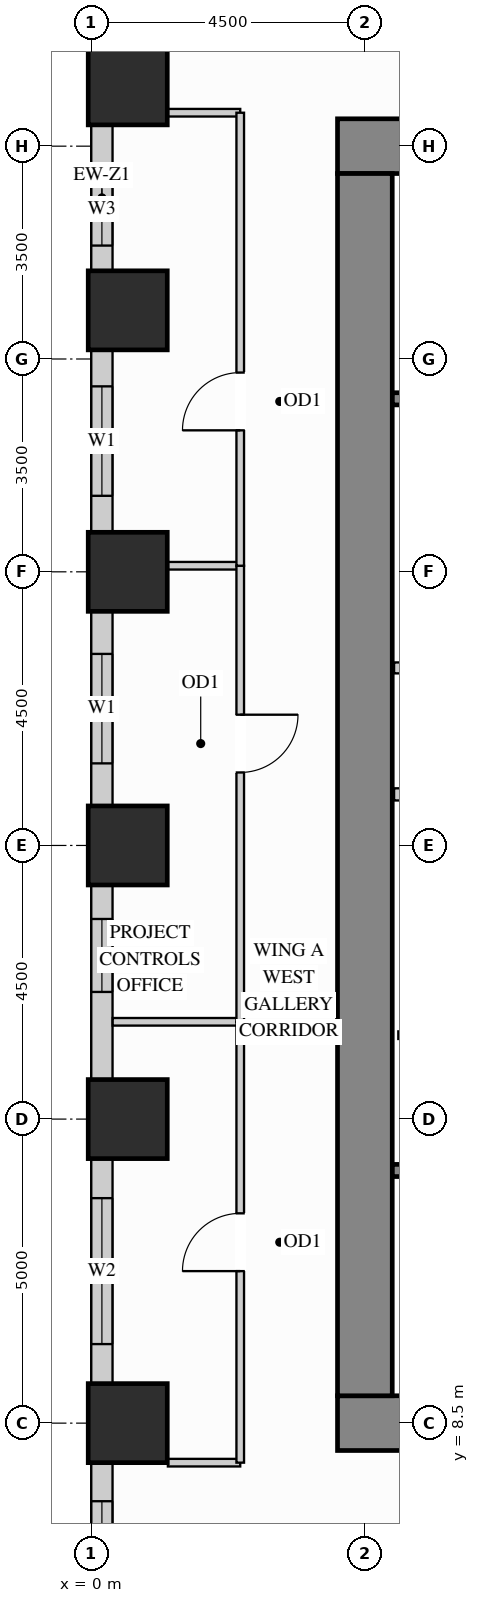
"""IFC4 building model, lengths in metres.
Left out: names, types, materials, properties, quantities, classifications, styles, units other than length and angle.
Written with IfcOpenShell. Run it as: python <this file> out.ifc"""

import sys

from ifc_helpers import new_model, si_unit, direction, frame, frame_2d, origin, origin_2d, place, context, subcontext, project, spatial, rectangle, extrude, source, transform, mapped, element, fill, save


model = new_model("IFC4")
c1 = context("Model", 3, precision=1e-05, world=origin(), true_north=direction((0.0, 1.0)))
c2 = subcontext(c1, "Body", "Model", "MODEL_VIEW")
j1 = project(units=[si_unit("LENGTHUNIT", "METRE"), si_unit("PLANEANGLEUNIT", "RADIAN")], contexts=[c1])
p1 = place(None, origin())
s1 = spatial("IfcSite", under=j1, at=p1, CompositionType="ELEMENT")
p2 = place(p1, origin())
s2 = spatial("IfcBuilding", under=s1, at=p2, CompositionType="ELEMENT")
p3 = place(p2, frame((0.0, 0.0, 47.7)))
s3 = spatial("IfcBuildingStorey", under=s2, at=p3, CompositionType="ELEMENT", Elevation=47.7)
m1 = source(origin(), c2, "Body", "SweptSolid", [
    extrude(rectangle(XDim=1.3, YDim=1.3, at=origin_2d()), origin(), (0.0, 0.0, 1.0), 3.38),
])
for number, where, z_axis, x_axis in (
    (1, (0.6, 13.5, 0.0), (0.0, 0.0, 1.0), (1.0, 0.0, 0.0)),
    (2, (0.6, 18.0, 0.0), (0.0, 0.0, 1.0), (1.0, 0.0, 0.0)),
    (3, (0.6, 22.5, 0.0), (0.0, 0.0, 1.0), (1.0, 0.0, 0.0)),
    (4, (0.6, 26.8, 0.0), (0.0, 0.0, 1.0), (1.0, 0.0, 0.0)),
    (5, (0.6, 30.5, 0.0), (0.0, 0.0, 1.0), (1.0, 0.0, 0.0)),
    (6, (0.6, 8.5, 0.0), (0.0, 0.0, 1.0), (1.0, 0.0, 0.0)),
):
    element("IfcColumn", number, at=place(p3, frame(where, z_axis=z_axis, x_axis=x_axis)), inside=s3, PredefinedType="COLUMN", context=c2, shape_type="MappedRepresentation", body=[
        mapped(m1, transform((0.0, 0.0, 0.0), x_axis=(1.0, 0.0, 0.0), y_axis=(0.0, 1.0, 0.0), z_axis=(0.0, 0.0, 1.0))),
    ])
m2 = source(origin(), c2, "Body", "SweptSolid", [
    extrude(rectangle(XDim=10.9, YDim=0.9, at=frame_2d((5.45, 0.0))), origin(), (0.0, 0.0, 1.0), 3.38),
])
for number, where, z_axis, x_axis in (
    (7, (4.05, 29.5, 0.0), (0.0, 0.0, 1.0), (1.0, 0.0, 0.0)),
    (8, (4.05, 8.5, 0.0), (0.0, 0.0, 1.0), (1.0, 0.0, 0.0)),
):
    element("IfcWall", number, at=place(p3, frame(where, z_axis=z_axis, x_axis=x_axis)), inside=s3, PredefinedType="SHEAR", context=c2, shape_type="MappedRepresentation", body=[
        mapped(m2, transform((0.0, 0.0, 0.0), x_axis=(1.0, 0.0, 0.0), y_axis=(0.0, 1.0, 0.0), z_axis=(0.0, 0.0, 1.0))),
    ])
m3 = source(origin(), c2, "Body", "SweptSolid", [
    extrude(rectangle(XDim=20.1, YDim=0.9, at=frame_2d((10.05, 0.0))), origin(), (0.0, 0.0, 1.0), 3.38),
])
p4 = place(p3, frame((4.5, 8.95, 0.0), z_axis=(0.0, 0.0, 1.0), x_axis=(0.0, 1.0, 0.0)))
e9 = element("IfcWall", 9, at=p4, inside=s3, PredefinedType="SHEAR", context=c2, shape_type="MappedRepresentation", body=[
    mapped(m3, transform((0.0, 0.0, 0.0), x_axis=(1.0, 0.0, 0.0), y_axis=(0.0, 1.0, 0.0), z_axis=(0.0, 0.0, 1.0))),
])
p5 = place(p3, frame((0.175, 29.852, 0.0), z_axis=(0.0, 0.0, 1.0), x_axis=(0.0, -1.0, 0.0)))
e10 = element("IfcWall", 10, at=p5, inside=s3, PredefinedType="SOLIDWALL", context=c2, shape_type="SweptSolid", body=[
    extrude(rectangle(XDim=2.404, YDim=0.35, at=frame_2d((1.202, 0.0))), origin(), (0.0, 0.0, 1.0), 2.51),
])
p6 = place(p5, frame((0.787, 0.0, 0.78)))
e11 = element("IfcOpeningElement", 11, at=p6, cuts=e10, PredefinedType="OPENING", context=c2, shape_type="SweptSolid", body=[
    extrude(rectangle(XDim=1.2, YDim=1.55, at=frame_2d((0.6, 0.775))), frame((0.0, 0.185, 0.0), z_axis=(0.0, -1.0, 0.0), x_axis=(1.0, 0.0, 0.0)), (0.0, 0.0, 1.0), 0.37),
])
p7 = place(p3, frame((0.175, 26.152, 0.0), z_axis=(0.0, 0.0, 1.0), x_axis=(0.0, -1.0, 0.0)))
e12 = element("IfcWall", 12, at=p7, inside=s3, PredefinedType="SOLIDWALL", context=c2, shape_type="SweptSolid", body=[
    extrude(rectangle(XDim=3.004, YDim=0.35, at=frame_2d((1.502, 0.0))), origin(), (0.0, 0.0, 1.0), 2.51),
])
p8 = place(p7, frame((0.602, 0.0, 0.78)))
e13 = element("IfcOpeningElement", 13, at=p8, cuts=e12, PredefinedType="OPENING", context=c2, shape_type="SweptSolid", body=[
    extrude(rectangle(XDim=1.8, YDim=1.55, at=frame_2d((0.9, 0.775))), frame((0.0, 0.185, 0.0), z_axis=(0.0, -1.0, 0.0), x_axis=(1.0, 0.0, 0.0)), (0.0, 0.0, 1.0), 0.37),
])
p9 = place(p3, frame((0.175, 21.852, 0.0), z_axis=(0.0, 0.0, 1.0), x_axis=(0.0, -1.0, 0.0)))
e14 = element("IfcWall", 14, at=p9, inside=s3, PredefinedType="SOLIDWALL", context=c2, shape_type="SweptSolid", body=[
    extrude(rectangle(XDim=3.204, YDim=0.35, at=frame_2d((1.602, 0.0))), origin(), (0.0, 0.0, 1.0), 2.51),
])
p10 = place(p9, frame((0.702, 0.0, 0.78)))
e15 = element("IfcOpeningElement", 15, at=p10, cuts=e14, PredefinedType="OPENING", context=c2, shape_type="SweptSolid", body=[
    extrude(rectangle(XDim=1.8, YDim=1.55, at=frame_2d((0.9, 0.775))), frame((0.0, 0.185, 0.0), z_axis=(0.0, -1.0, 0.0), x_axis=(1.0, 0.0, 0.0)), (0.0, 0.0, 1.0), 0.37),
])
p11 = place(p3, frame((0.175, 17.352, 0.0), z_axis=(0.0, 0.0, 1.0), x_axis=(0.0, -1.0, 0.0)))
e16 = element("IfcWall", 16, at=p11, inside=s3, PredefinedType="SOLIDWALL", context=c2, shape_type="SweptSolid", body=[
    extrude(rectangle(XDim=3.204, YDim=0.35, at=frame_2d((1.602, 0.0))), origin(), (0.0, 0.0, 1.0), 2.51),
])
p12 = place(p11, frame((0.561, 0.0, 0.78)))
e17 = element("IfcOpeningElement", 17, at=p12, cuts=e16, PredefinedType="OPENING", context=c2, shape_type="SweptSolid", body=[
    extrude(rectangle(XDim=1.2, YDim=1.55, at=frame_2d((0.6, 0.775))), frame((0.0, 0.185, 0.0), z_axis=(0.0, -1.0, 0.0), x_axis=(1.0, 0.0, 0.0)), (0.0, 0.0, 1.0), 0.37),
])
p13 = place(p3, frame((0.175, 12.852, 0.0), z_axis=(0.0, 0.0, 1.0), x_axis=(0.0, -1.0, 0.0)))
e18 = element("IfcWall", 18, at=p13, inside=s3, PredefinedType="SOLIDWALL", context=c2, shape_type="SweptSolid", body=[
    extrude(rectangle(XDim=3.704, YDim=0.35, at=frame_2d((1.852, 0.0))), origin(), (0.0, 0.0, 1.0), 2.51),
])
p14 = place(p13, frame((0.652, 0.0, 0.78)))
e19 = element("IfcOpeningElement", 19, at=p14, cuts=e18, PredefinedType="OPENING", context=c2, shape_type="SweptSolid", body=[
    extrude(rectangle(XDim=2.4, YDim=1.55, at=frame_2d((1.2, 0.775))), frame((0.0, 0.185, 0.0), z_axis=(0.0, -1.0, 0.0), x_axis=(1.0, 0.0, 0.0)), (0.0, 0.0, 1.0), 0.37),
])
p15 = place(p3, frame((0.175, 7.852, 0.0), z_axis=(0.0, 0.0, 1.0), x_axis=(0.0, -1.0, 0.0)))
e20 = element("IfcWall", 20, at=p15, inside=s3, PredefinedType="SOLIDWALL", context=c2, shape_type="SweptSolid", body=[
    extrude(rectangle(XDim=3.704, YDim=0.35, at=frame_2d((1.852, 0.0))), origin(), (0.0, 0.0, 1.0), 2.51),
])
p16 = place(p15, frame((0.636, 0.0, 0.78)))
e21 = element("IfcOpeningElement", 21, at=p16, cuts=e20, PredefinedType="OPENING", context=c2, shape_type="SweptSolid", body=[
    extrude(rectangle(XDim=1.2, YDim=1.55, at=frame_2d((0.6, 0.775))), frame((0.0, 0.185, 0.0), z_axis=(0.0, -1.0, 0.0), x_axis=(1.0, 0.0, 0.0)), (0.0, 0.0, 1.0), 0.37),
])
m4 = source(origin(), c2, "Body", "SweptSolid", [
    extrude(rectangle(XDim=2.17, YDim=0.18, at=frame_2d((1.085, 0.0))), origin(), (0.0, 0.0, 1.0), 3.365),
])
p17 = place(p3, frame((4.98, 20.92, 0.0), z_axis=(0.0, 0.0, 1.0), x_axis=(1.0, 0.0, 0.0)))
e22 = element("IfcWall", 22, at=p17, inside=s3, PredefinedType="PARTITIONING", context=c2, shape_type="MappedRepresentation", body=[
    mapped(m4, transform((0.0, 0.0, 0.0), x_axis=(1.0, 0.0, 0.0), y_axis=(0.0, 1.0, 0.0), z_axis=(0.0, 0.0, 1.0))),
])
p18 = place(p3, frame((5.05, 14.88, 0.0), z_axis=(0.0, 0.0, 1.0), x_axis=(1.0, 0.0, 0.0)))
e23 = element("IfcWall", 23, at=p18, inside=s3, PredefinedType="PARTITIONING", context=c2, shape_type="SweptSolid", body=[
    extrude(rectangle(XDim=2.35, YDim=0.125, at=frame_2d((1.175, 0.0))), origin(), (0.0, 0.0, 1.0), 3.365),
])
p19 = place(p18, frame((0.7, 0.0, 0.0)))
e24 = element("IfcOpeningElement", 24, at=p19, cuts=e23, PredefinedType="OPENING", context=c2, shape_type="SweptSolid", body=[
    extrude(rectangle(XDim=0.85, YDim=2.1, at=frame_2d((0.425, 1.05))), frame((0.0, 0.073, 0.0), z_axis=(0.0, -1.0, 0.0), x_axis=(1.0, 0.0, 0.0)), (0.0, 0.0, 1.0), 0.145),
])
m5 = source(origin(), c2, "Body", "SweptSolid", [
    extrude(rectangle(XDim=1.19, YDim=0.125, at=frame_2d((0.595, 0.0))), origin(), (0.0, 0.0, 1.0), 3.365),
])
for number, where, z_axis, x_axis in (
    (25, (1.26, 30.05, 0.0), (0.0, 0.0, 1.0), (1.0, 0.0, 0.0)),
    (26, (1.26, 7.85, 0.0), (0.0, 0.0, 1.0), (1.0, 0.0, 0.0)),
):
    element("IfcWall", number, at=place(p3, frame(where, z_axis=z_axis, x_axis=x_axis)), inside=s3, PredefinedType="PARTITIONING", context=c2, shape_type="MappedRepresentation", body=[
        mapped(m5, transform((0.0, 0.0, 0.0), x_axis=(1.0, 0.0, 0.0), y_axis=(0.0, 1.0, 0.0), z_axis=(0.0, 0.0, 1.0))),
    ])
m6 = source(origin(), c2, "Body", "SweptSolid", [
    extrude(rectangle(XDim=2.098, YDim=0.125, at=frame_2d((1.049, 0.0))), origin(), (0.0, 0.0, 1.0), 3.365),
])
p20 = place(p3, frame((0.352, 15.1, 0.0), z_axis=(0.0, 0.0, 1.0), x_axis=(1.0, 0.0, 0.0)))
e27 = element("IfcWall", 27, at=p20, inside=s3, PredefinedType="PARTITIONING", context=c2, shape_type="MappedRepresentation", body=[
    mapped(m6, transform((0.0, 0.0, 0.0), x_axis=(1.0, 0.0, 0.0), y_axis=(0.0, 1.0, 0.0), z_axis=(0.0, 0.0, 1.0))),
])
p21 = place(p3, frame((1.26, 22.6, 0.0), z_axis=(0.0, 0.0, 1.0), x_axis=(1.0, 0.0, 0.0)))
e28 = element("IfcWall", 28, at=p21, inside=s3, PredefinedType="PARTITIONING", context=c2, shape_type="MappedRepresentation", body=[
    mapped(m5, transform((0.0, 0.0, 0.0), x_axis=(1.0, 0.0, 0.0), y_axis=(0.0, 1.0, 0.0), z_axis=(0.0, 0.0, 1.0))),
])
p22 = place(p3, frame((2.45, 7.85, 0.0), z_axis=(0.0, 0.0, 1.0), x_axis=(0.0, 1.0, 0.0)))
e29 = element("IfcWall", 29, at=p22, inside=s3, PredefinedType="PARTITIONING", context=c2, shape_type="SweptSolid", body=[
    extrude(rectangle(XDim=7.25, YDim=0.125, at=frame_2d((3.625, 0.0))), origin(), (0.0, 0.0, 1.0), 3.365),
])
p23 = place(p22, frame((3.15, 0.0, 0.0)))
e30 = element("IfcOpeningElement", 30, at=p23, cuts=e29, PredefinedType="OPENING", context=c2, shape_type="SweptSolid", body=[
    extrude(rectangle(XDim=0.95, YDim=2.15, at=frame_2d((0.475, 1.075))), frame((0.0, 0.073, 0.0), z_axis=(0.0, -1.0, 0.0), x_axis=(1.0, 0.0, 0.0)), (0.0, 0.0, 1.0), 0.145),
])
p24 = place(p3, frame((2.45, 15.1, 0.0), z_axis=(0.0, 0.0, 1.0), x_axis=(0.0, 1.0, 0.0)))
e31 = element("IfcWall", 31, at=p24, inside=s3, PredefinedType="PARTITIONING", context=c2, shape_type="SweptSolid", body=[
    extrude(rectangle(XDim=7.5, YDim=0.125, at=frame_2d((3.75, 0.0))), origin(), (0.0, 0.0, 1.0), 3.365),
])
p25 = place(p24, frame((4.1, 0.0, 0.0)))
e32 = element("IfcOpeningElement", 32, at=p25, cuts=e31, PredefinedType="OPENING", context=c2, shape_type="SweptSolid", body=[
    extrude(rectangle(XDim=0.95, YDim=2.15, at=frame_2d((0.475, 1.075))), frame((0.0, 0.073, 0.0), z_axis=(0.0, -1.0, 0.0), x_axis=(1.0, 0.0, 0.0)), (0.0, 0.0, 1.0), 0.145),
])
p26 = place(p3, frame((2.45, 22.6, 0.0), z_axis=(0.0, 0.0, 1.0), x_axis=(0.0, 1.0, 0.0)))
e33 = element("IfcWall", 33, at=p26, inside=s3, PredefinedType="PARTITIONING", context=c2, shape_type="SweptSolid", body=[
    extrude(rectangle(XDim=7.45, YDim=0.125, at=frame_2d((3.725, 0.0))), origin(), (0.0, 0.0, 1.0), 3.365),
])
p27 = place(p26, frame((2.227, 0.0, 0.0)))
e34 = element("IfcOpeningElement", 34, at=p27, cuts=e33, PredefinedType="OPENING", context=c2, shape_type="SweptSolid", body=[
    extrude(rectangle(XDim=0.95, YDim=2.15, at=frame_2d((0.475, 1.075))), frame((0.0, 0.073, 0.0), z_axis=(0.0, -1.0, 0.0), x_axis=(1.0, 0.0, 0.0)), (0.0, 0.0, 1.0), 0.145),
])
m7 = source(origin(), c2, "Body", "SweptSolid", [
    extrude(rectangle(XDim=2.09, YDim=0.2, at=frame_2d((1.045, 0.0))), origin(), (0.0, 0.0, 1.0), 3.365),
])
p28 = place(p3, frame((4.98, 18.84, 0.0), z_axis=(0.0, 0.0, 1.0), x_axis=(1.0, 0.0, 0.0)))
e35 = element("IfcWall", 35, at=p28, inside=s3, PredefinedType="PARTITIONING", context=c2, shape_type="MappedRepresentation", body=[
    mapped(m7, transform((0.0, 0.0, 0.0), x_axis=(1.0, 0.0, 0.0), y_axis=(0.0, 1.0, 0.0), z_axis=(0.0, 0.0, 1.0))),
])
p29 = place(p3, frame((4.952, 12.655, 0.0), z_axis=(0.0, 0.0, 1.0), x_axis=(1.0, 0.0, 0.0)))
e36 = element("IfcWall", 36, at=p29, inside=s3, PredefinedType="SHEAR", context=c2, shape_type="SweptSolid", body=[
    extrude(rectangle(XDim=7.453, YDim=0.2, at=frame_2d((3.727, 0.0))), origin(), (0.0, 0.0, 1.0), 3.38),
])
p30 = place(p29, frame((0.4, 0.0, 0.0)))
e37 = element("IfcOpeningElement", 37, at=p30, cuts=e36, PredefinedType="OPENING", context=c2, shape_type="SweptSolid", body=[
    extrude(rectangle(XDim=1.1, YDim=2.15, at=frame_2d((0.55, 1.075))), frame((0.0, 0.11, 0.0), z_axis=(0.0, -1.0, 0.0), x_axis=(1.0, 0.0, 0.0)), (0.0, 0.0, 1.0), 0.22),
])
p31 = place(p3, frame((4.952, 25.345, 0.0), z_axis=(0.0, 0.0, 1.0), x_axis=(1.0, 0.0, 0.0)))
e38 = element("IfcWall", 38, at=p31, inside=s3, PredefinedType="SHEAR", context=c2, shape_type="SweptSolid", body=[
    extrude(rectangle(XDim=7.453, YDim=0.2, at=frame_2d((3.727, 0.0))), origin(), (0.0, 0.0, 1.0), 3.38),
])
p32 = place(p31, frame((0.4, 0.0, 0.0)))
e39 = element("IfcOpeningElement", 39, at=p32, cuts=e38, PredefinedType="OPENING", context=c2, shape_type="SweptSolid", body=[
    extrude(rectangle(XDim=1.1, YDim=2.15, at=frame_2d((0.55, 1.075))), frame((0.0, 0.11, 0.0), z_axis=(0.0, -1.0, 0.0), x_axis=(1.0, 0.0, 0.0)), (0.0, 0.0, 1.0), 0.22),
])
m8 = source(origin(), c2, "Body", "SweptSolid", [
    extrude(rectangle(XDim=0.95, YDim=2.15, at=frame_2d((0.475, 1.075))), frame((0.0, 0.025, 0.0), z_axis=(0.0, -1.0, 0.0), x_axis=(1.0, 0.0, 0.0)), (0.0, 0.0, 1.0), 0.05),
])
p33 = place(p23, origin())
e40 = element("IfcDoor", 40, at=p33, inside=s3, OperationType="SINGLE_SWING_LEFT", PredefinedType="DOOR", context=c2, shape_type="MappedRepresentation", body=[
    mapped(m8, transform((0.0, 0.0, 0.0), x_axis=(1.0, 0.0, 0.0), y_axis=(0.0, 1.0, 0.0), z_axis=(0.0, 0.0, 1.0))),
])
fill(e30, e40)
p34 = place(p25, origin())
e41 = element("IfcDoor", 41, at=p34, inside=s3, OperationType="SINGLE_SWING_RIGHT", PredefinedType="DOOR", context=c2, shape_type="MappedRepresentation", body=[
    mapped(m8, transform((0.0, 0.0, 0.0), x_axis=(1.0, 0.0, 0.0), y_axis=(0.0, 1.0, 0.0), z_axis=(0.0, 0.0, 1.0))),
])
fill(e32, e41)
p35 = place(p27, origin())
e42 = element("IfcDoor", 42, at=p35, inside=s3, OperationType="SINGLE_SWING_LEFT", PredefinedType="DOOR", context=c2, shape_type="MappedRepresentation", body=[
    mapped(m8, transform((0.0, 0.0, 0.0), x_axis=(1.0, 0.0, 0.0), y_axis=(0.0, 1.0, 0.0), z_axis=(0.0, 0.0, 1.0))),
])
fill(e34, e42)
m9 = source(origin(), c2, "Body", "SweptSolid", [
    extrude(rectangle(XDim=1.8, YDim=1.55, at=frame_2d((0.9, 0.775))), frame((0.0, 0.03, 0.0), z_axis=(0.0, -1.0, 0.0), x_axis=(1.0, 0.0, 0.0)), (0.0, 0.0, 1.0), 0.06),
])
p36 = place(p8, origin())
e43 = element("IfcWindow", 43, at=p36, inside=s3, PartitioningType="SINGLE_PANEL", PredefinedType="WINDOW", context=c2, shape_type="MappedRepresentation", body=[
    mapped(m9, transform((0.0, 0.0, 0.0), x_axis=(1.0, 0.0, 0.0), y_axis=(0.0, 1.0, 0.0), z_axis=(0.0, 0.0, 1.0))),
])
fill(e13, e43)
p37 = place(p10, origin())
e44 = element("IfcWindow", 44, at=p37, inside=s3, PartitioningType="SINGLE_PANEL", PredefinedType="WINDOW", context=c2, shape_type="MappedRepresentation", body=[
    mapped(m9, transform((0.0, 0.0, 0.0), x_axis=(1.0, 0.0, 0.0), y_axis=(0.0, 1.0, 0.0), z_axis=(0.0, 0.0, 1.0))),
])
fill(e15, e44)
m10 = source(origin(), c2, "Body", "SweptSolid", [
    extrude(rectangle(XDim=2.4, YDim=1.55, at=frame_2d((1.2, 0.775))), frame((0.0, 0.03, 0.0), z_axis=(0.0, -1.0, 0.0), x_axis=(1.0, 0.0, 0.0)), (0.0, 0.0, 1.0), 0.06),
])
p38 = place(p14, origin())
e45 = element("IfcWindow", 45, at=p38, inside=s3, PartitioningType="SINGLE_PANEL", PredefinedType="WINDOW", context=c2, shape_type="MappedRepresentation", body=[
    mapped(m10, transform((0.0, 0.0, 0.0), x_axis=(1.0, 0.0, 0.0), y_axis=(0.0, 1.0, 0.0), z_axis=(0.0, 0.0, 1.0))),
])
fill(e19, e45)
m11 = source(origin(), c2, "Body", "SweptSolid", [
    extrude(rectangle(XDim=1.2, YDim=1.55, at=frame_2d((0.6, 0.775))), frame((0.0, 0.03, 0.0), z_axis=(0.0, -1.0, 0.0), x_axis=(1.0, 0.0, 0.0)), (0.0, 0.0, 1.0), 0.06),
])
p39 = place(p6, origin())
e46 = element("IfcWindow", 46, at=p39, inside=s3, PartitioningType="SINGLE_PANEL", PredefinedType="WINDOW", context=c2, shape_type="MappedRepresentation", body=[
    mapped(m11, transform((0.0, 0.0, 0.0), x_axis=(1.0, 0.0, 0.0), y_axis=(0.0, 1.0, 0.0), z_axis=(0.0, 0.0, 1.0))),
])
fill(e11, e46)
p40 = place(p12, origin())
e47 = element("IfcWindow", 47, at=p40, inside=s3, PartitioningType="SINGLE_PANEL", PredefinedType="WINDOW", context=c2, shape_type="MappedRepresentation", body=[
    mapped(m11, transform((0.0, 0.0, 0.0), x_axis=(1.0, 0.0, 0.0), y_axis=(0.0, 1.0, 0.0), z_axis=(0.0, 0.0, 1.0))),
])
fill(e17, e47)
p41 = place(p16, origin())
e48 = element("IfcWindow", 48, at=p41, inside=s3, PartitioningType="SINGLE_PANEL", PredefinedType="WINDOW", context=c2, shape_type="MappedRepresentation", body=[
    mapped(m11, transform((0.0, 0.0, 0.0), x_axis=(1.0, 0.0, 0.0), y_axis=(0.0, 1.0, 0.0), z_axis=(0.0, 0.0, 1.0))),
])
fill(e21, e48)
save(model, sys.argv[1])
